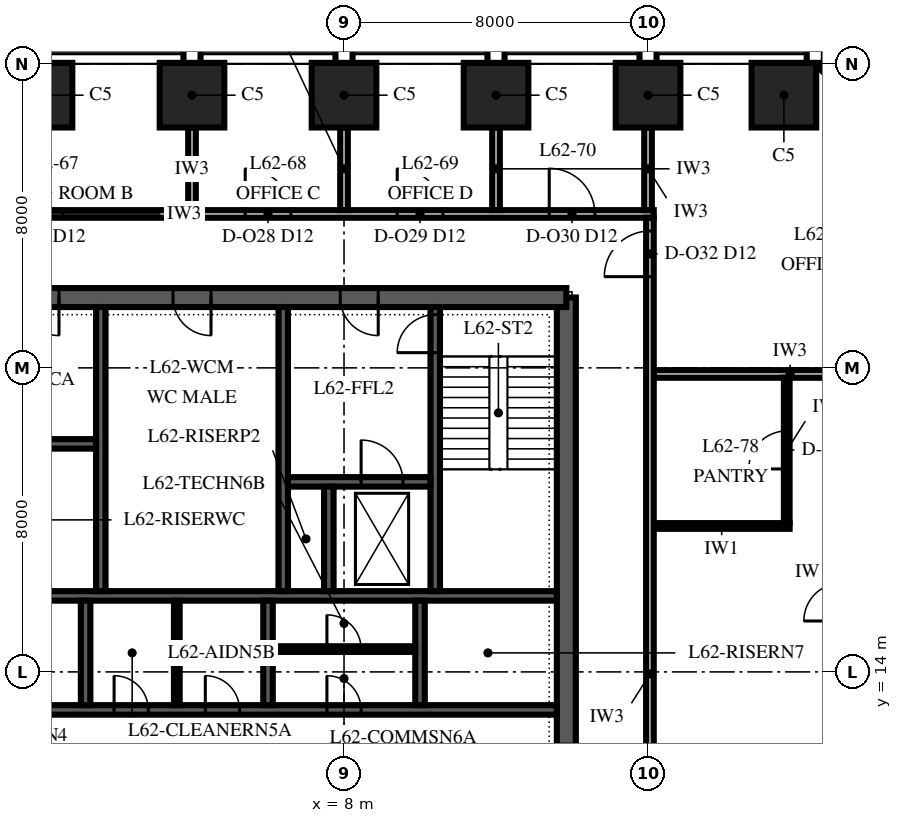
"""IFC4 building model, lengths in metres.
Left out: names, types, materials, properties, quantities, classifications, styles, units other than length and angle.
Written with IfcOpenShell. Run it as: python <this file> out.ifc"""

import sys

from ifc_helpers import new_model, si_unit, direction, frame, frame_2d, origin, origin_2d, place, context, subcontext, project, spatial, polyline, rectangle, outline, extrude, element, fill, save


model = new_model("IFC4")
c1 = context("Model", 3, precision=1e-05, world=origin(), true_north=direction((0.0, 1.0)))
c2 = subcontext(c1, "Body", "Model", "MODEL_VIEW")
j1 = project(units=[si_unit("LENGTHUNIT", "METRE"), si_unit("PLANEANGLEUNIT", "RADIAN")], contexts=[c1])
p1 = place(None, origin())
s1 = spatial("IfcSite", under=j1, at=p1, CompositionType="ELEMENT")
p2 = place(p1, origin())
s2 = spatial("IfcBuilding", under=s1, at=p2, CompositionType="ELEMENT")
p3 = place(p2, frame((0.0, 0.0, 268.0)))
s3 = spatial("IfcBuildingStorey", under=s2, at=p3, CompositionType="ELEMENT", Elevation=268.0)
for number, where, z_axis, x_axis in (
    (1, (19.575, 29.175, 0.0), (0.0, 0.0, 1.0), (-1.0, 0.0, 0.0)),
    (2, (16.0, 29.175, 0.0), (0.0, 0.0, 1.0), (-1.0, 0.0, 0.0)),
    (3, (12.0, 29.175, 0.0), (0.0, 0.0, 1.0), (-1.0, 0.0, 0.0)),
    (4, (8.0, 29.175, 0.0), (0.0, 0.0, 1.0), (-1.0, 0.0, 0.0)),
    (5, (4.0, 29.175, 0.0), (0.0, 0.0, 1.0), (-1.0, 0.0, 0.0)),
    (6, (0.0, 29.175, 0.0), (0.0, 0.0, 1.0), (-1.0, 0.0, 0.0)),
):
    element("IfcColumn", number, at=place(p3, frame(where, z_axis=z_axis, x_axis=x_axis)), inside=s3, PredefinedType="COLUMN", context=c2, shape_type="SweptSolid", body=[
        extrude(rectangle(XDim=1.7, YDim=1.7, at=origin_2d()), origin(), (0.0, 0.0, 1.0), 4.0),
    ])
p4 = place(p3, frame((13.85, 6.15, 0.0), z_axis=(0.0, 0.0, 1.0), x_axis=(0.0, 1.0, 0.0)))
e7 = element("IfcWall", 7, at=p4, inside=s3, PredefinedType="SHEAR", context=c2, shape_type="SweptSolid", body=[
    extrude(outline(polyline([(0.0, -0.25), (17.7, -0.25), (17.7, 0.0), (17.45, 0.0), (17.45, 0.25), (0.25, 0.25), (0.25, 0.0), (0.0, 0.0), (0.0, -0.25)])), origin(), (0.0, 0.0, 1.0), 4.0),
])
p5 = place(p4, frame((4.15, 0.0, 0.0)))
e8 = element("IfcOpeningElement", 8, at=p5, cuts=e7, PredefinedType="OPENING", context=c2, shape_type="SweptSolid", body=[
    extrude(rectangle(XDim=1.8, YDim=2.4, at=frame_2d((0.9, 1.2))), frame((0.0, 0.265, 0.0), z_axis=(0.0, -1.0, 0.0), x_axis=(1.0, 0.0, 0.0)), (0.0, 0.0, 1.0), 0.53),
])
p6 = place(p3, frame((13.85, 23.85, 0.0), z_axis=(0.0, 0.0, 1.0), x_axis=(-1.0, 0.0, 0.0)))
e9 = element("IfcWall", 9, at=p6, inside=s3, PredefinedType="SHEAR", context=c2, shape_type="SweptSolid", body=[
    extrude(rectangle(XDim=27.7, YDim=0.5, at=frame_2d((13.85, 0.0))), origin(), (0.0, 0.0, 1.0), 4.0),
])
p7 = place(p6, frame((21.75, 0.0, 0.0)))
e10 = element("IfcOpeningElement", 10, at=p7, cuts=e9, PredefinedType="OPENING", context=c2, shape_type="SweptSolid", body=[
    extrude(rectangle(XDim=1.0, YDim=2.1, at=frame_2d((0.5, 1.05))), frame((0.0, 0.265, 0.0), z_axis=(0.0, -1.0, 0.0), x_axis=(1.0, 0.0, 0.0)), (0.0, 0.0, 1.0), 0.53),
])
p8 = place(p6, frame((4.95, 0.0, 0.0)))
e11 = element("IfcOpeningElement", 11, at=p8, cuts=e9, PredefinedType="OPENING", context=c2, shape_type="SweptSolid", body=[
    extrude(rectangle(XDim=1.0, YDim=2.1, at=frame_2d((0.5, 1.05))), frame((0.0, 0.265, 0.0), z_axis=(0.0, -1.0, 0.0), x_axis=(1.0, 0.0, 0.0)), (0.0, 0.0, 1.0), 0.53),
])
p9 = place(p6, frame((17.35, 0.0, 0.0)))
e12 = element("IfcOpeningElement", 12, at=p9, cuts=e9, PredefinedType="OPENING", context=c2, shape_type="SweptSolid", body=[
    extrude(rectangle(XDim=1.0, YDim=2.1, at=frame_2d((0.5, 1.05))), frame((0.0, 0.265, 0.0), z_axis=(0.0, -1.0, 0.0), x_axis=(1.0, 0.0, 0.0)), (0.0, 0.0, 1.0), 0.53),
])
p10 = place(p6, frame((13.35, 0.0, 0.0)))
e13 = element("IfcOpeningElement", 13, at=p10, cuts=e9, PredefinedType="OPENING", context=c2, shape_type="SweptSolid", body=[
    extrude(rectangle(XDim=1.0, YDim=2.1, at=frame_2d((0.5, 1.05))), frame((0.0, 0.265, 0.0), z_axis=(0.0, -1.0, 0.0), x_axis=(1.0, 0.0, 0.0)), (0.0, 0.0, 1.0), 0.53),
])
p11 = place(p6, frame((9.35, 0.0, 0.0)))
e14 = element("IfcOpeningElement", 14, at=p11, cuts=e9, PredefinedType="OPENING", context=c2, shape_type="SweptSolid", body=[
    extrude(rectangle(XDim=1.0, YDim=2.1, at=frame_2d((0.5, 1.05))), frame((0.0, 0.265, 0.0), z_axis=(0.0, -1.0, 0.0), x_axis=(1.0, 0.0, 0.0)), (0.0, 0.0, 1.0), 0.53),
])
p12 = place(p3, frame((-13.6, 13.0, 0.0), z_axis=(0.0, 0.0, 1.0), x_axis=(1.0, 0.0, 0.0)))
e15 = element("IfcWall", 15, at=p12, inside=s3, PredefinedType="SHEAR", context=c2, shape_type="SweptSolid", body=[
    extrude(rectangle(XDim=27.2, YDim=0.25, at=frame_2d((13.6, 0.0))), origin(), (0.0, 0.0, 1.0), 4.0),
])
p13 = place(p12, frame((15.55, 0.0, 0.0)))
e16 = element("IfcOpeningElement", 16, at=p13, cuts=e15, PredefinedType="OPENING", context=c2, shape_type="SweptSolid", body=[
    extrude(rectangle(XDim=0.9, YDim=2.1, at=frame_2d((0.45, 1.05))), frame((0.0, 0.14, 0.0), z_axis=(0.0, -1.0, 0.0), x_axis=(1.0, 0.0, 0.0)), (0.0, 0.0, 1.0), 0.28),
])
p14 = place(p12, frame((17.95, 0.0, 0.0)))
e17 = element("IfcOpeningElement", 17, at=p14, cuts=e15, PredefinedType="OPENING", context=c2, shape_type="SweptSolid", body=[
    extrude(rectangle(XDim=0.9, YDim=2.1, at=frame_2d((0.45, 1.05))), frame((0.0, 0.14, 0.0), z_axis=(0.0, -1.0, 0.0), x_axis=(1.0, 0.0, 0.0)), (0.0, 0.0, 1.0), 0.28),
])
p15 = place(p12, frame((21.15, 0.0, 0.0)))
e18 = element("IfcOpeningElement", 18, at=p15, cuts=e15, PredefinedType="OPENING", context=c2, shape_type="SweptSolid", body=[
    extrude(rectangle(XDim=0.9, YDim=2.1, at=frame_2d((0.45, 1.05))), frame((0.0, 0.14, 0.0), z_axis=(0.0, -1.0, 0.0), x_axis=(1.0, 0.0, 0.0)), (0.0, 0.0, 1.0), 0.28),
])
p16 = place(p12, frame((0.55, 0.0, 0.0)))
e19 = element("IfcOpeningElement", 19, at=p16, cuts=e15, PredefinedType="OPENING", context=c2, shape_type="SweptSolid", body=[
    extrude(rectangle(XDim=0.9, YDim=2.1, at=frame_2d((0.45, 1.05))), frame((0.0, 0.14, 0.0), z_axis=(0.0, -1.0, 0.0), x_axis=(1.0, 0.0, 0.0)), (0.0, 0.0, 1.0), 0.28),
])
p17 = place(p12, frame((3.35, 0.0, 0.0)))
e20 = element("IfcOpeningElement", 20, at=p17, cuts=e15, PredefinedType="OPENING", context=c2, shape_type="SweptSolid", body=[
    extrude(rectangle(XDim=0.9, YDim=2.1, at=frame_2d((0.45, 1.05))), frame((0.0, 0.14, 0.0), z_axis=(0.0, -1.0, 0.0), x_axis=(1.0, 0.0, 0.0)), (0.0, 0.0, 1.0), 0.28),
])
p18 = place(p12, frame((6.15, 0.0, 0.0)))
e21 = element("IfcOpeningElement", 21, at=p18, cuts=e15, PredefinedType="OPENING", context=c2, shape_type="SweptSolid", body=[
    extrude(rectangle(XDim=0.9, YDim=2.1, at=frame_2d((0.45, 1.05))), frame((0.0, 0.14, 0.0), z_axis=(0.0, -1.0, 0.0), x_axis=(1.0, 0.0, 0.0)), (0.0, 0.0, 1.0), 0.28),
])
p19 = place(p3, frame((-13.6, 16.0, 0.0), z_axis=(0.0, 0.0, 1.0), x_axis=(1.0, 0.0, 0.0)))
e22 = element("IfcWall", 22, at=p19, inside=s3, PredefinedType="SHEAR", context=c2, shape_type="SweptSolid", body=[
    extrude(rectangle(XDim=27.2, YDim=0.25, at=frame_2d((13.6, 0.0))), origin(), (0.0, 0.0, 1.0), 4.0),
])
for number, where, z_axis, x_axis in (
    (23, (1.2, 13.125, 0.0), (0.0, 0.0, 1.0), (0.0, 1.0, 0.0)),
    (24, (6.0, 13.125, 0.0), (0.0, 0.0, 1.0), (0.0, 1.0, 0.0)),
    (25, (10.0, 13.125, 0.0), (0.0, 0.0, 1.0), (0.0, 1.0, 0.0)),
):
    element("IfcWall", number, at=place(p3, frame(where, z_axis=z_axis, x_axis=x_axis)), inside=s3, PredefinedType="SHEAR", context=c2, shape_type="SweptSolid", body=[
        extrude(rectangle(XDim=2.75, YDim=0.25, at=frame_2d((1.375, 0.0))), origin(), (0.0, 0.0, 1.0), 4.0),
    ])
for number, where, z_axis, x_axis in (
    (26, (1.6, 16.125, 0.0), (0.0, 0.0, 1.0), (0.0, 1.0, 0.0)),
    (27, (6.4, 16.125, 0.0), (0.0, 0.0, 1.0), (0.0, 1.0, 0.0)),
):
    element("IfcWall", number, at=place(p3, frame(where, z_axis=z_axis, x_axis=x_axis)), inside=s3, PredefinedType="SHEAR", context=c2, shape_type="SweptSolid", body=[
        extrude(rectangle(XDim=7.475, YDim=0.25, at=frame_2d((3.738, 0.0))), origin(), (0.0, 0.0, 1.0), 4.0),
    ])
p20 = place(p3, frame((10.4, 16.125, 0.0), z_axis=(0.0, 0.0, 1.0), x_axis=(0.0, 1.0, 0.0)))
e28 = element("IfcWall", 28, at=p20, inside=s3, PredefinedType="SHEAR", context=c2, shape_type="SweptSolid", body=[
    extrude(rectangle(XDim=7.475, YDim=0.25, at=frame_2d((3.738, 0.0))), origin(), (0.0, 0.0, 1.0), 4.0),
])
p21 = place(p20, frame((6.275, 0.0, 0.0)))
e29 = element("IfcOpeningElement", 29, at=p21, cuts=e28, PredefinedType="OPENING", context=c2, shape_type="SweptSolid", body=[
    extrude(rectangle(XDim=1.0, YDim=2.1, at=frame_2d((0.5, 1.05))), frame((0.0, 0.14, 0.0), z_axis=(0.0, -1.0, 0.0), x_axis=(1.0, 0.0, 0.0)), (0.0, 0.0, 1.0), 0.28),
])
p22 = place(p3, frame((6.525, 19.0, 0.0), z_axis=(0.0, 0.0, 1.0), x_axis=(1.0, 0.0, 0.0)))
e30 = element("IfcWall", 30, at=p22, inside=s3, PredefinedType="SHEAR", context=c2, shape_type="SweptSolid", body=[
    extrude(rectangle(XDim=3.75, YDim=0.25, at=frame_2d((1.875, 0.0))), origin(), (0.0, 0.0, 1.0), 4.0),
])
p23 = place(p22, frame((1.925, 0.0, 0.0)))
e31 = element("IfcOpeningElement", 31, at=p23, cuts=e30, PredefinedType="OPENING", context=c2, shape_type="SweptSolid", body=[
    extrude(rectangle(XDim=1.1, YDim=2.1, at=frame_2d((0.55, 1.05))), frame((0.0, 0.14, 0.0), z_axis=(0.0, -1.0, 0.0), x_axis=(1.0, 0.0, 0.0)), (0.0, 0.0, 1.0), 0.28),
])
p24 = place(p3, frame((7.6, 16.125, 0.0), z_axis=(0.0, 0.0, 1.0), x_axis=(0.0, 1.0, 0.0)))
e32 = element("IfcWall", 32, at=p24, inside=s3, PredefinedType="SHEAR", context=c2, shape_type="SweptSolid", body=[
    extrude(rectangle(XDim=2.75, YDim=0.25, at=frame_2d((1.375, 0.0))), origin(), (0.0, 0.0, 1.0), 4.0),
])
p25 = place(p3, frame((-1.475, 20.0, 0.0), z_axis=(0.0, 0.0, 1.0), x_axis=(1.0, 0.0, 0.0)))
e33 = element("IfcWall", 33, at=p25, inside=s3, PredefinedType="SHEAR", context=c2, shape_type="SweptSolid", body=[
    extrude(rectangle(XDim=2.95, YDim=0.25, at=frame_2d((1.475, 0.0))), origin(), (0.0, 0.0, 1.0), 4.0),
])
p26 = place(p3, frame((3.6, 13.125, 0.0), z_axis=(0.0, 0.0, 1.0), x_axis=(0.0, 1.0, 0.0)))
e34 = element("IfcWall", 34, at=p26, inside=s3, PredefinedType="PARTITIONING", context=c2, shape_type="SweptSolid", body=[
    extrude(rectangle(XDim=2.75, YDim=0.15, at=frame_2d((1.375, 0.0))), origin(), (0.0, 0.0, 1.0), 3.85),
])
p27 = place(p3, frame((6.125, 14.6, 0.0), z_axis=(0.0, 0.0, 1.0), x_axis=(1.0, 0.0, 0.0)))
e35 = element("IfcWall", 35, at=p27, inside=s3, PredefinedType="PARTITIONING", context=c2, shape_type="SweptSolid", body=[
    extrude(rectangle(XDim=3.75, YDim=0.15, at=frame_2d((1.875, 0.0))), origin(), (0.0, 0.0, 1.0), 3.85),
])
p28 = place(p27, frame((1.425, 0.0, 0.0)))
e36 = element("IfcOpeningElement", 36, at=p28, cuts=e35, PredefinedType="OPENING", context=c2, shape_type="SweptSolid", body=[
    extrude(rectangle(XDim=0.9, YDim=2.1, at=frame_2d((0.45, 1.05))), frame((0.0, 0.09, 0.0), z_axis=(0.0, -1.0, 0.0), x_axis=(1.0, 0.0, 0.0)), (0.0, 0.0, 1.0), 0.18),
])
p29 = place(p3, frame((16.15, 17.84, 0.0), z_axis=(0.0, 0.0, 1.0), x_axis=(1.0, 0.0, 0.0)))
e37 = element("IfcWall", 37, at=p29, inside=s3, PredefinedType="PARTITIONING", context=c2, shape_type="SweptSolid", body=[
    extrude(rectangle(XDim=3.575, YDim=0.15, at=frame_2d((1.788, 0.0))), origin(), (0.0, 0.0, 1.0), 3.23),
])
p30 = place(p3, frame((16.15, 21.84, 0.0), z_axis=(0.0, 0.0, 1.0), x_axis=(1.0, 0.0, 0.0)))
e38 = element("IfcWall", 38, at=p30, inside=s3, PredefinedType="PARTITIONING", context=c2, shape_type="SweptSolid", body=[
    extrude(rectangle(XDim=7.174, YDim=0.2, at=frame_2d((3.587, 0.0))), origin(), (0.0, 0.0, 1.0), 3.23),
])
p31 = place(p3, frame((-16.15, 26.05, 0.0), z_axis=(0.0, 0.0, 1.0), x_axis=(1.0, 0.0, 0.0)))
e39 = element("IfcWall", 39, at=p31, inside=s3, PredefinedType="PARTITIONING", context=c2, shape_type="SweptSolid", body=[
    extrude(rectangle(XDim=32.3, YDim=0.2, at=frame_2d((16.15, 0.0))), origin(), (0.0, 0.0, 1.0), 3.418),
])
p32 = place(p31, frame((1.55, 0.0, 0.0)))
e40 = element("IfcOpeningElement", 40, at=p32, cuts=e39, PredefinedType="OPENING", context=c2, shape_type="SweptSolid", body=[
    extrude(rectangle(XDim=1.2, YDim=2.4, at=frame_2d((0.6, 1.2))), frame((0.0, 0.115, 0.0), z_axis=(0.0, -1.0, 0.0), x_axis=(1.0, 0.0, 0.0)), (0.0, 0.0, 1.0), 0.23),
])
p33 = place(p31, frame((5.55, 0.0, 0.0)))
e41 = element("IfcOpeningElement", 41, at=p33, cuts=e39, PredefinedType="OPENING", context=c2, shape_type="SweptSolid", body=[
    extrude(rectangle(XDim=1.2, YDim=2.4, at=frame_2d((0.6, 1.2))), frame((0.0, 0.115, 0.0), z_axis=(0.0, -1.0, 0.0), x_axis=(1.0, 0.0, 0.0)), (0.0, 0.0, 1.0), 0.23),
])
p34 = place(p31, frame((9.55, 0.0, 0.0)))
e42 = element("IfcOpeningElement", 42, at=p34, cuts=e39, PredefinedType="OPENING", context=c2, shape_type="SweptSolid", body=[
    extrude(rectangle(XDim=1.2, YDim=2.4, at=frame_2d((0.6, 1.2))), frame((0.0, 0.115, 0.0), z_axis=(0.0, -1.0, 0.0), x_axis=(1.0, 0.0, 0.0)), (0.0, 0.0, 1.0), 0.23),
])
p35 = place(p31, frame((15.55, 0.0, 0.0)))
e43 = element("IfcOpeningElement", 43, at=p35, cuts=e39, PredefinedType="OPENING", context=c2, shape_type="SweptSolid", body=[
    extrude(rectangle(XDim=1.2, YDim=2.4, at=frame_2d((0.6, 1.2))), frame((0.0, 0.115, 0.0), z_axis=(0.0, -1.0, 0.0), x_axis=(1.0, 0.0, 0.0)), (0.0, 0.0, 1.0), 0.23),
])
p36 = place(p31, frame((21.55, 0.0, 0.0)))
e44 = element("IfcOpeningElement", 44, at=p36, cuts=e39, PredefinedType="OPENING", context=c2, shape_type="SweptSolid", body=[
    extrude(rectangle(XDim=1.2, YDim=2.4, at=frame_2d((0.6, 1.2))), frame((0.0, 0.115, 0.0), z_axis=(0.0, -1.0, 0.0), x_axis=(1.0, 0.0, 0.0)), (0.0, 0.0, 1.0), 0.23),
])
p37 = place(p31, frame((25.55, 0.0, 0.0)))
e45 = element("IfcOpeningElement", 45, at=p37, cuts=e39, PredefinedType="OPENING", context=c2, shape_type="SweptSolid", body=[
    extrude(rectangle(XDim=1.2, YDim=2.4, at=frame_2d((0.6, 1.2))), frame((0.0, 0.115, 0.0), z_axis=(0.0, -1.0, 0.0), x_axis=(1.0, 0.0, 0.0)), (0.0, 0.0, 1.0), 0.23),
])
p38 = place(p31, frame((29.55, 0.0, 0.0)))
e46 = element("IfcOpeningElement", 46, at=p38, cuts=e39, PredefinedType="OPENING", context=c2, shape_type="SweptSolid", body=[
    extrude(rectangle(XDim=1.2, YDim=2.4, at=frame_2d((0.6, 1.2))), frame((0.0, 0.115, 0.0), z_axis=(0.0, -1.0, 0.0), x_axis=(1.0, 0.0, 0.0)), (0.0, 0.0, 1.0), 0.23),
])
for number, where, z_axis, x_axis in (
    (47, (4.0, 26.15, 0.0), (0.0, 0.0, 1.0), (0.0, 1.0, 0.0)),
    (48, (8.0, 26.15, 0.0), (0.0, 0.0, 1.0), (0.0, 1.0, 0.0)),
    (49, (12.0, 26.15, 0.0), (0.0, 0.0, 1.0), (0.0, 1.0, 0.0)),
    (50, (16.0, 26.15, 0.0), (0.0, 0.0, 1.0), (0.0, 1.0, 0.0)),
):
    element("IfcWall", number, at=place(p3, frame(where, z_axis=z_axis, x_axis=x_axis)), inside=s3, PredefinedType="PARTITIONING", context=c2, shape_type="SweptSolid", body=[
        extrude(rectangle(XDim=2.175, YDim=0.2, at=frame_2d((1.087, 0.0))), origin(), (0.0, 0.0, 1.0), 3.418),
    ])
p39 = place(p3, frame((16.05, 1.94, 0.0), z_axis=(0.0, 0.0, 1.0), x_axis=(0.0, 1.0, 0.0)))
e51 = element("IfcWall", 51, at=p39, inside=s3, PredefinedType="PARTITIONING", context=c2, shape_type="SweptSolid", body=[
    extrude(rectangle(XDim=24.01, YDim=0.2, at=frame_2d((12.005, 0.0))), origin(), (0.0, 0.0, 1.0), 2.842),
])
p40 = place(p39, frame((22.46, 0.0, 0.0)))
e52 = element("IfcOpeningElement", 52, at=p40, cuts=e51, PredefinedType="OPENING", context=c2, shape_type="SweptSolid", body=[
    extrude(rectangle(XDim=1.2, YDim=2.4, at=frame_2d((0.6, 1.2))), frame((0.0, 0.115, 0.0), z_axis=(0.0, -1.0, 0.0), x_axis=(1.0, 0.0, 0.0)), (0.0, 0.0, 1.0), 0.23),
])
p41 = place(p39, frame((6.46, 0.0, 0.0)))
e53 = element("IfcOpeningElement", 53, at=p41, cuts=e51, PredefinedType="OPENING", context=c2, shape_type="SweptSolid", body=[
    extrude(rectangle(XDim=1.2, YDim=2.4, at=frame_2d((0.6, 1.2))), frame((0.0, 0.115, 0.0), z_axis=(0.0, -1.0, 0.0), x_axis=(1.0, 0.0, 0.0)), (0.0, 0.0, 1.0), 0.23),
])
p42 = place(p3, frame((19.65, 17.915, 0.0), z_axis=(0.0, 0.0, 1.0), x_axis=(0.0, 1.0, 0.0)))
e54 = element("IfcWall", 54, at=p42, inside=s3, PredefinedType="PARTITIONING", context=c2, shape_type="SweptSolid", body=[
    extrude(rectangle(XDim=3.825, YDim=0.15, at=frame_2d((1.913, 0.0))), origin(), (0.0, 0.0, 1.0), 3.23),
])
p43 = place(p42, frame((1.425, 0.0, 0.0)))
e55 = element("IfcOpeningElement", 55, at=p43, cuts=e54, PredefinedType="OPENING", context=c2, shape_type="SweptSolid", body=[
    extrude(rectangle(XDim=1.0, YDim=2.3, at=frame_2d((0.5, 1.15))), frame((0.0, 0.09, 0.0), z_axis=(0.0, -1.0, 0.0), x_axis=(1.0, 0.0, 0.0)), (0.0, 0.0, 1.0), 0.18),
])
p44 = place(p8, origin())
e56 = element("IfcDoor", 56, at=p44, inside=s3, OperationType="SINGLE_SWING_RIGHT", PredefinedType="DOOR", context=c2, shape_type="SweptSolid", body=[
    extrude(rectangle(XDim=1.0, YDim=2.1, at=frame_2d((0.5, 1.05))), frame((0.0, 0.25, 0.0), z_axis=(0.0, -1.0, 0.0), x_axis=(1.0, 0.0, 0.0)), (0.0, 0.0, 1.0), 0.5),
])
fill(e11, e56)
p45 = place(p10, origin())
e57 = element("IfcDoor", 57, at=p45, inside=s3, OperationType="SINGLE_SWING_LEFT", PredefinedType="DOOR", context=c2, shape_type="SweptSolid", body=[
    extrude(rectangle(XDim=1.0, YDim=2.1, at=frame_2d((0.5, 1.05))), frame((0.0, 0.25, 0.0), z_axis=(0.0, -1.0, 0.0), x_axis=(1.0, 0.0, 0.0)), (0.0, 0.0, 1.0), 0.5),
])
fill(e13, e57)
p46 = place(p11, origin())
e58 = element("IfcDoor", 58, at=p46, inside=s3, OperationType="SINGLE_SWING_LEFT", PredefinedType="DOOR", context=c2, shape_type="SweptSolid", body=[
    extrude(rectangle(XDim=1.0, YDim=2.1, at=frame_2d((0.5, 1.05))), frame((0.0, 0.25, 0.0), z_axis=(0.0, -1.0, 0.0), x_axis=(1.0, 0.0, 0.0)), (0.0, 0.0, 1.0), 0.5),
])
fill(e14, e58)
p47 = place(p21, origin())
e59 = element("IfcDoor", 59, at=p47, inside=s3, OperationType="SINGLE_SWING_LEFT", PredefinedType="DOOR", context=c2, shape_type="SweptSolid", body=[
    extrude(rectangle(XDim=1.0, YDim=2.1, at=frame_2d((0.5, 1.05))), frame((0.0, 0.125, 0.0), z_axis=(0.0, -1.0, 0.0), x_axis=(1.0, 0.0, 0.0)), (0.0, 0.0, 1.0), 0.25),
])
fill(e29, e59)
p48 = place(p23, origin())
e60 = element("IfcDoor", 60, at=p48, inside=s3, OperationType="SLIDING_TO_RIGHT", PredefinedType="DOOR", context=c2, shape_type="SweptSolid", body=[
    extrude(rectangle(XDim=1.1, YDim=2.1, at=frame_2d((0.55, 1.05))), frame((0.0, 0.125, 0.0), z_axis=(0.0, -1.0, 0.0), x_axis=(1.0, 0.0, 0.0)), (0.0, 0.0, 1.0), 0.25),
])
fill(e31, e60)
p49 = place(p13, origin())
e61 = element("IfcDoor", 61, at=p49, inside=s3, OperationType="SINGLE_SWING_LEFT", PredefinedType="DOOR", context=c2, shape_type="SweptSolid", body=[
    extrude(rectangle(XDim=0.9, YDim=2.1, at=frame_2d((0.45, 1.05))), frame((0.0, 0.125, 0.0), z_axis=(0.0, -1.0, 0.0), x_axis=(1.0, 0.0, 0.0)), (0.0, 0.0, 1.0), 0.25),
])
fill(e16, e61)
p50 = place(p14, origin())
e62 = element("IfcDoor", 62, at=p50, inside=s3, OperationType="SINGLE_SWING_LEFT", PredefinedType="DOOR", context=c2, shape_type="SweptSolid", body=[
    extrude(rectangle(XDim=0.9, YDim=2.1, at=frame_2d((0.45, 1.05))), frame((0.0, 0.125, 0.0), z_axis=(0.0, -1.0, 0.0), x_axis=(1.0, 0.0, 0.0)), (0.0, 0.0, 1.0), 0.25),
])
fill(e17, e62)
p51 = place(p15, origin())
e63 = element("IfcDoor", 63, at=p51, inside=s3, OperationType="SINGLE_SWING_LEFT", PredefinedType="DOOR", context=c2, shape_type="SweptSolid", body=[
    extrude(rectangle(XDim=0.9, YDim=2.1, at=frame_2d((0.45, 1.05))), frame((0.0, 0.125, 0.0), z_axis=(0.0, -1.0, 0.0), x_axis=(1.0, 0.0, 0.0)), (0.0, 0.0, 1.0), 0.25),
])
fill(e18, e63)
p52 = place(p28, origin())
e64 = element("IfcDoor", 64, at=p52, inside=s3, OperationType="SINGLE_SWING_LEFT", PredefinedType="DOOR", context=c2, shape_type="SweptSolid", body=[
    extrude(rectangle(XDim=0.9, YDim=2.1, at=frame_2d((0.45, 1.05))), frame((0.0, 0.075, 0.0), z_axis=(0.0, -1.0, 0.0), x_axis=(1.0, 0.0, 0.0)), (0.0, 0.0, 1.0), 0.149),
])
fill(e36, e64)
p53 = place(p43, origin())
e65 = element("IfcDoor", 65, at=p53, inside=s3, OperationType="SINGLE_SWING_LEFT", PredefinedType="DOOR", context=c2, shape_type="SweptSolid", body=[
    extrude(rectangle(XDim=1.0, YDim=2.3, at=frame_2d((0.5, 1.15))), frame((0.0, 0.075, 0.0), z_axis=(0.0, -1.0, 0.0), x_axis=(1.0, 0.0, 0.0)), (0.0, 0.0, 1.0), 0.149),
])
fill(e55, e65)
p54 = place(p35, origin())
e66 = element("IfcDoor", 66, at=p54, inside=s3, OperationType="SINGLE_SWING_LEFT", PredefinedType="DOOR", context=c2, shape_type="SweptSolid", body=[
    extrude(rectangle(XDim=1.2, YDim=2.4, at=frame_2d((0.6, 1.2))), frame((0.0, 0.1, 0.0), z_axis=(0.0, -1.0, 0.0), x_axis=(1.0, 0.0, 0.0)), (0.0, 0.0, 1.0), 0.199),
])
fill(e43, e66)
p55 = place(p36, origin())
e67 = element("IfcDoor", 67, at=p55, inside=s3, OperationType="SINGLE_SWING_LEFT", PredefinedType="DOOR", context=c2, shape_type="SweptSolid", body=[
    extrude(rectangle(XDim=1.2, YDim=2.4, at=frame_2d((0.6, 1.2))), frame((0.0, 0.1, 0.0), z_axis=(0.0, -1.0, 0.0), x_axis=(1.0, 0.0, 0.0)), (0.0, 0.0, 1.0), 0.199),
])
fill(e44, e67)
p56 = place(p37, origin())
e68 = element("IfcDoor", 68, at=p56, inside=s3, OperationType="SINGLE_SWING_LEFT", PredefinedType="DOOR", context=c2, shape_type="SweptSolid", body=[
    extrude(rectangle(XDim=1.2, YDim=2.4, at=frame_2d((0.6, 1.2))), frame((0.0, 0.1, 0.0), z_axis=(0.0, -1.0, 0.0), x_axis=(1.0, 0.0, 0.0)), (0.0, 0.0, 1.0), 0.199),
])
fill(e45, e68)
p57 = place(p38, origin())
e69 = element("IfcDoor", 69, at=p57, inside=s3, OperationType="SINGLE_SWING_LEFT", PredefinedType="DOOR", context=c2, shape_type="SweptSolid", body=[
    extrude(rectangle(XDim=1.2, YDim=2.4, at=frame_2d((0.6, 1.2))), frame((0.0, 0.1, 0.0), z_axis=(0.0, -1.0, 0.0), x_axis=(1.0, 0.0, 0.0)), (0.0, 0.0, 1.0), 0.199),
])
fill(e46, e69)
p58 = place(p40, origin())
e70 = element("IfcDoor", 70, at=p58, inside=s3, OperationType="SINGLE_SWING_LEFT", PredefinedType="DOOR", context=c2, shape_type="SweptSolid", body=[
    extrude(rectangle(XDim=1.2, YDim=2.4, at=frame_2d((0.6, 1.2))), frame((0.0, 0.1, 0.0), z_axis=(0.0, -1.0, 0.0), x_axis=(1.0, 0.0, 0.0)), (0.0, 0.0, 1.0), 0.199),
])
fill(e52, e70)
save(model, sys.argv[1])
